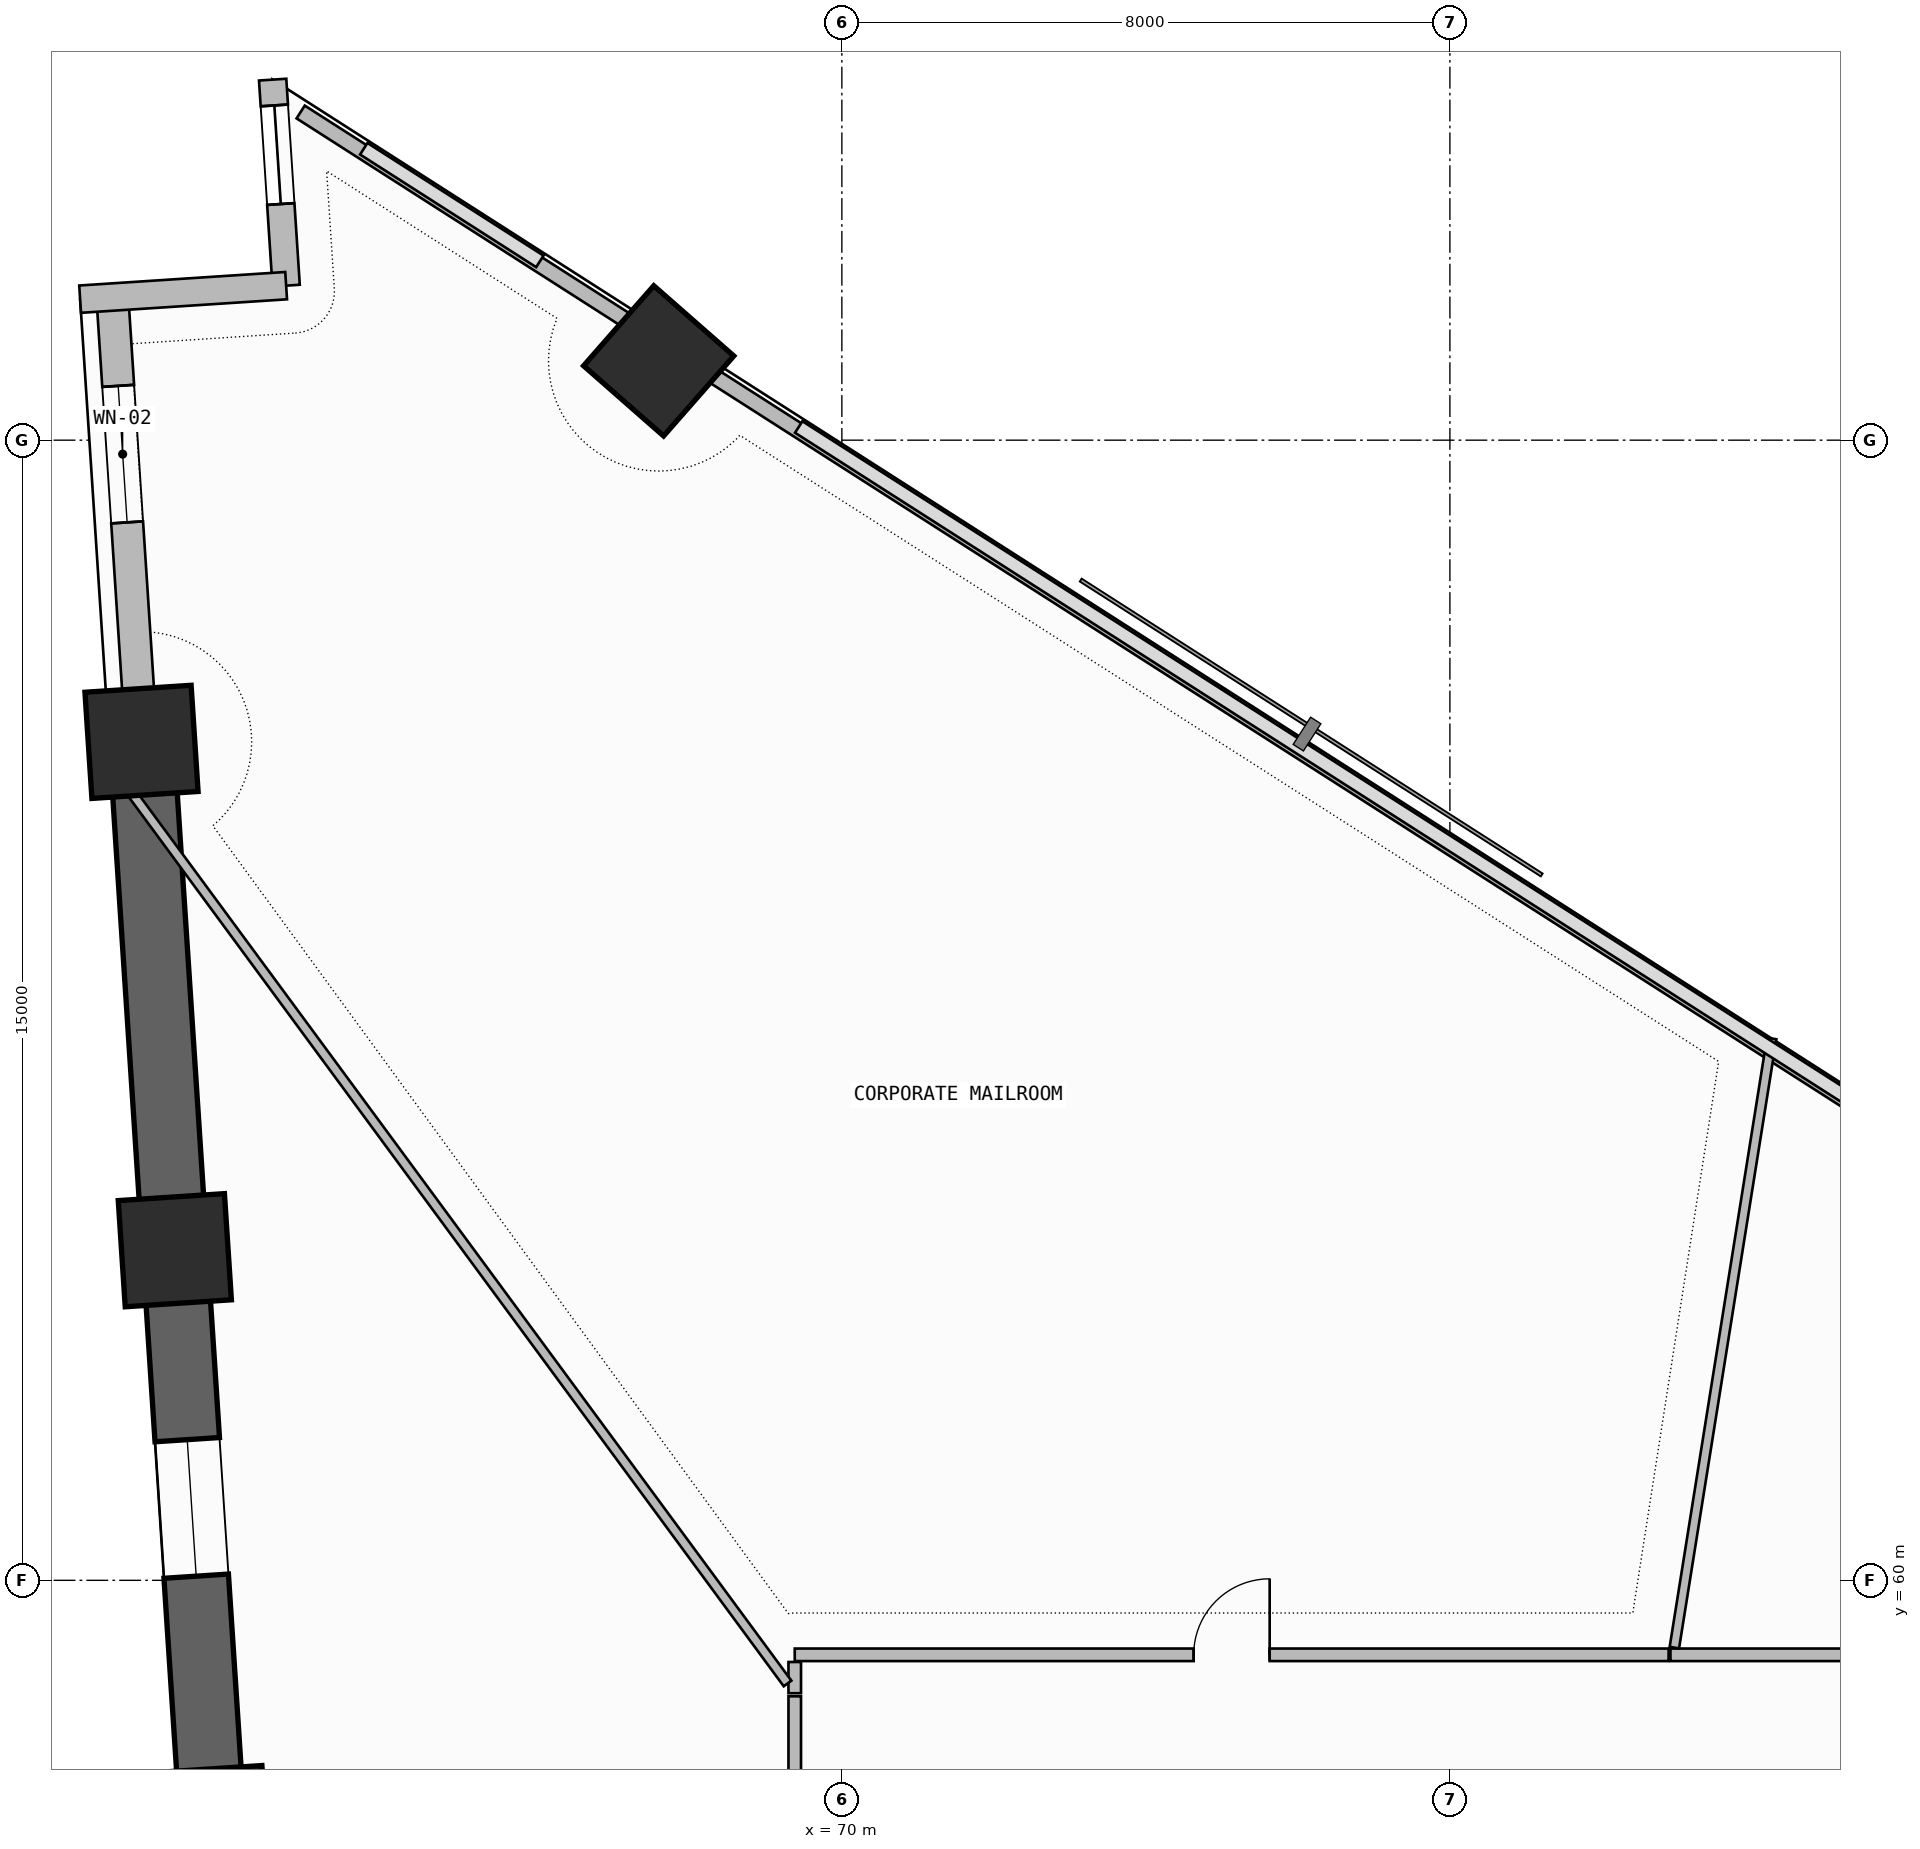
"""IFC4 building model, lengths in metres.
Left out: names, types, materials, properties, quantities, classifications, styles, units other than length and angle.
Written with IfcOpenShell. Run it as: python <this file> out.ifc"""

import sys

from ifc_helpers import new_model, si_unit, direction, frame, frame_2d, origin, origin_2d, place, context, subcontext, project, spatial, rectangle, extrude, element, fill, save


model = new_model("IFC4")
c1 = context("Model", 3, precision=1e-05, world=origin(), true_north=direction((0.0, 1.0)))
c2 = subcontext(c1, "Body", "Model", "MODEL_VIEW")
j1 = project(units=[si_unit("LENGTHUNIT", "METRE"), si_unit("PLANEANGLEUNIT", "RADIAN")], contexts=[c1])
p1 = place(None, origin())
s1 = spatial("IfcSite", under=j1, at=p1, CompositionType="ELEMENT")
p2 = place(p1, origin())
s2 = spatial("IfcBuilding", under=s1, at=p2, CompositionType="ELEMENT")
p3 = place(p2, frame((0.0, 0.0, 88.5)))
s3 = spatial("IfcBuildingStorey", under=s2, at=p3, CompositionType="ELEMENT", Elevation=88.5)
for number, where, z_axis, x_axis in (
    (1, (67.59, 76.043, 0.0), (0.0, 0.0, 1.0), (0.659, 0.752, 0.0)),
    (2, (60.785, 71.031, 0.0), (0.0, 0.0, 1.0), (-0.065, 0.998, 0.0)),
    (3, (61.224, 64.343, 0.0), (0.0, 0.0, 1.0), (-0.065, 0.998, 0.0)),
    (4, (61.717, 56.819, 0.0), (0.0, 0.0, 1.0), (-0.065, 0.998, 0.0)),
):
    element("IfcColumn", number, at=place(p3, frame(where, z_axis=z_axis, x_axis=x_axis)), inside=s3, PredefinedType="COLUMN", context=c2, shape_type="SweptSolid", body=[
        extrude(rectangle(XDim=1.4, YDim=1.4, at=origin_2d()), origin(), (0.0, 0.0, 1.0), 3.6),
    ])
p4 = place(p3, frame((60.402, 76.883, 0.0), z_axis=(0.0, 0.0, 1.0), x_axis=(0.065402662459, -0.997858953832, 0.0)))
e5 = element("IfcWall", 5, at=p4, inside=s3, PredefinedType="SOLIDWALL", context=c2, shape_type="SweptSolid", body=[
    extrude(rectangle(XDim=5.864, YDim=0.42, at=frame_2d((2.932, 0.0))), origin(), (0.0, 0.0, 1.0), 2.725),
])
p5 = place(p4, frame((1.171, 0.0, 1.2)))
e6 = element("IfcOpeningElement", 6, at=p5, cuts=e5, PredefinedType="OPENING", context=c2, shape_type="SweptSolid", body=[
    extrude(rectangle(XDim=1.8, YDim=0.9, at=frame_2d((0.9, 0.45))), frame((0.0, 0.22, 0.0), z_axis=(0.0, -1.0, 0.0), x_axis=(1.0, 0.0, 0.0)), (0.0, 0.0, 1.0), 0.44),
])
p6 = place(p3, frame((60.785, 71.031, -0.26), z_axis=(0.0, 0.0, 1.0), x_axis=(0.065409824833, -0.997858484363, 0.0)))
e7 = element("IfcWall", 7, at=p6, inside=s3, PredefinedType="SHEAR", context=c2, shape_type="SweptSolid", body=[
    extrude(rectangle(XDim=21.783, YDim=0.85, at=frame_2d((10.891, 0.0))), origin(), (0.0, 0.0, 1.0), 3.6),
])
p7 = place(p6, frame((9.2, 0.0, 1.2)))
e8 = element("IfcOpeningElement", 8, at=p7, cuts=e7, PredefinedType="OPENING", context=c2, shape_type="SweptSolid", body=[
    extrude(rectangle(XDim=1.8, YDim=0.9, at=frame_2d((0.9, 0.45))), frame((0.0, 0.435, 0.0), z_axis=(0.0, -1.0, 0.0), x_axis=(1.0, 0.0, 0.0)), (0.0, 0.0, 1.0), 0.87),
])
p8 = place(p3, frame((62.511, 79.743, 0.0), z_axis=(0.0, 0.0, 1.0), x_axis=(0.065337885661, -0.997863197386, 0.0)))
e9 = element("IfcWall", 9, at=p8, inside=s3, PredefinedType="SOLIDWALL", context=c2, shape_type="SweptSolid", body=[
    extrude(rectangle(XDim=2.717, YDim=0.36, at=frame_2d((1.358, 0.0))), origin(), (0.0, 0.0, 1.0), 3.34),
])
p9 = place(p8, frame((0.34, 0.0, 0.45)))
e10 = element("IfcOpeningElement", 10, at=p9, cuts=e9, PredefinedType="OPENING", context=c2, shape_type="SweptSolid", body=[
    extrude(rectangle(XDim=1.3, YDim=2.4, at=frame_2d((0.65, 1.2))), frame((0.0, 0.19, 0.0), z_axis=(0.0, -1.0, 0.0), x_axis=(1.0, 0.0, 0.0)), (0.0, 0.0, 1.0), 0.38),
])
p10 = place(p3, frame((62.688, 77.033, 0.0), z_axis=(0.0, 0.0, 1.0), x_axis=(-0.99785694905, -0.065433242561, 0.0)))
e11 = element("IfcWall", 11, at=p10, inside=s3, PredefinedType="SOLIDWALL", context=c2, shape_type="SweptSolid", body=[
    extrude(rectangle(XDim=2.716, YDim=0.36, at=frame_2d((1.358, 0.0))), origin(), (0.0, 0.0, 1.0), 3.34),
])
p11 = place(p3, frame((84.682, 65.372, 0.0), z_axis=(0.0, 0.0, 1.0), x_axis=(-0.842418773655, 0.538823356763, 0.0)))
e12 = element("IfcWall", 12, at=p11, inside=s3, PredefinedType="PARAPET", context=c2, shape_type="SweptSolid", body=[
    extrude(rectangle(XDim=19.612, YDim=0.2, at=frame_2d((9.806, 0.0))), origin(), (0.0, 0.0, 1.0), 1.15),
])
p12 = place(p3, frame((67.257, 76.518, 0.0), z_axis=(0.0, 0.0, 1.0), x_axis=(-0.842403631411, 0.538847030042, 0.0)))
e13 = element("IfcWall", 13, at=p12, inside=s3, PredefinedType="PARAPET", context=c2, shape_type="SweptSolid", body=[
    extrude(rectangle(XDim=5.196, YDim=0.2, at=frame_2d((2.598, 0.0))), origin(), (0.0, 0.0, 1.0), 1.15),
])
p13 = place(p3, frame((88.238, 59.02, 0.0), z_axis=(0.0, 0.0, 1.0), x_axis=(-1.0, 0.0, 0.0)))
e14 = element("IfcWall", 14, at=p13, inside=s3, PredefinedType="PARTITIONING", context=c2, shape_type="SweptSolid", body=[
    extrude(rectangle(XDim=7.336, YDim=0.165, at=frame_2d((3.668, 0.0))), origin(), (0.0, 0.0, 1.0), 2.725),
])
p14 = place(p13, frame((4.058, 0.0, 0.0)))
e15 = element("IfcOpeningElement", 15, at=p14, cuts=e14, PredefinedType="OPENING", context=c2, shape_type="SweptSolid", body=[
    extrude(rectangle(XDim=1.0, YDim=2.2, at=frame_2d((0.5, 1.1))), frame((0.0, 0.093, 0.0), z_axis=(0.0, -1.0, 0.0), x_axis=(1.0, 0.0, 0.0)), (0.0, 0.0, 1.0), 0.185),
])
p15 = place(p3, frame((80.953, 59.115, 0.0), z_axis=(0.0, 0.0, 1.0), x_axis=(0.157731190012, 0.987482086773, 0.0)))
e16 = element("IfcWall", 16, at=p15, inside=s3, PredefinedType="PARTITIONING", context=c2, shape_type="SweptSolid", body=[
    extrude(rectangle(XDim=8.115, YDim=0.125, at=frame_2d((4.058, 0.0))), origin(), (0.0, 0.0, 1.0), 2.875),
])
p16 = place(p3, frame((80.877, 59.02, 0.0), z_axis=(0.0, 0.0, 1.0), x_axis=(-1.0, 0.0, 0.0)))
e17 = element("IfcWall", 17, at=p16, inside=s3, PredefinedType="PARTITIONING", context=c2, shape_type="SweptSolid", body=[
    extrude(rectangle(XDim=11.498, YDim=0.165, at=frame_2d((5.749, 0.0))), origin(), (0.0, 0.0, 1.0), 2.725),
])
p17 = place(p16, frame((5.249, 0.0, 0.0)))
e18 = element("IfcOpeningElement", 18, at=p17, cuts=e17, PredefinedType="OPENING", context=c2, shape_type="SweptSolid", body=[
    extrude(rectangle(XDim=1.0, YDim=2.2, at=frame_2d((0.5, 1.1))), frame((0.0, 0.093, 0.0), z_axis=(0.0, -1.0, 0.0), x_axis=(1.0, 0.0, 0.0)), (0.0, 0.0, 1.0), 0.185),
])
p18 = place(p3, frame((69.38, 58.926, 0.0), z_axis=(0.0, 0.0, 1.0), x_axis=(0.0, -1.0, 0.0)))
e19 = element("IfcWall", 19, at=p18, inside=s3, PredefinedType="PARTITIONING", context=c2, shape_type="SweptSolid", body=[
    extrude(rectangle(XDim=0.411, YDim=0.165, at=frame_2d((0.206, 0.0))), origin(), (0.0, 0.0, 1.0), 2.725),
])
p19 = place(p3, frame((69.285, 58.643, 0.0), z_axis=(0.0, 0.0, 1.0), x_axis=(-0.59305096897, 0.805164919879, 0.0)))
e20 = element("IfcWall", 20, at=p19, inside=s3, PredefinedType="PARTITIONING", context=c2, shape_type="SweptSolid", body=[
    extrude(rectangle(XDim=15.018, YDim=0.125, at=frame_2d((7.509, 0.0))), origin(), (0.0, 0.0, 1.0), 2.725),
])
p20 = place(p3, frame((69.38, 58.474, 0.0), z_axis=(0.0, 0.0, 1.0), x_axis=(0.0, -1.0, 0.0)))
e21 = element("IfcWall", 21, at=p20, inside=s3, PredefinedType="PARTITIONING", context=c2, shape_type="SweptSolid", body=[
    extrude(rectangle(XDim=11.344, YDim=0.165, at=frame_2d((5.672, 0.0))), origin(), (0.0, 0.0, 1.0), 2.725),
])
p21 = place(p20, frame((7.957, 0.0, 0.0)))
e22 = element("IfcOpeningElement", 22, at=p21, cuts=e21, PredefinedType="OPENING", context=c2, shape_type="SweptSolid", body=[
    extrude(rectangle(XDim=1.0, YDim=2.2, at=frame_2d((0.5, 1.1))), frame((0.0, 0.093, 0.0), z_axis=(0.0, -1.0, 0.0), x_axis=(1.0, 0.0, 0.0)), (0.0, 0.0, 1.0), 0.185),
])
p22 = place(p5, origin())
e23 = element("IfcWindow", 23, at=p22, inside=s3, PartitioningType="SINGLE_PANEL", PredefinedType="WINDOW", context=c2, shape_type="SweptSolid", body=[
    extrude(rectangle(XDim=1.8, YDim=0.9, at=frame_2d((0.9, 0.45))), frame((0.0, 0.03, 0.0), z_axis=(0.0, -1.0, 0.0), x_axis=(1.0, 0.0, 0.0)), (0.0, 0.0, 1.0), 0.06),
])
fill(e6, e23)
p23 = place(p7, origin())
e24 = element("IfcWindow", 24, at=p23, inside=s3, PartitioningType="SINGLE_PANEL", PredefinedType="WINDOW", context=c2, shape_type="SweptSolid", body=[
    extrude(rectangle(XDim=1.8, YDim=0.9, at=frame_2d((0.9, 0.45))), frame((0.0, 0.03, 0.0), z_axis=(0.0, -1.0, 0.0), x_axis=(1.0, 0.0, 0.0)), (0.0, 0.0, 1.0), 0.06),
])
fill(e8, e24)
p24 = place(p9, origin())
e25 = element("IfcWindow", 25, at=p24, inside=s3, PartitioningType="SINGLE_PANEL", PredefinedType="WINDOW", context=c2, shape_type="SweptSolid", body=[
    extrude(rectangle(XDim=1.3, YDim=2.4, at=frame_2d((0.65, 1.2))), frame((0.0, 0.03, 0.0), z_axis=(0.0, -1.0, 0.0), x_axis=(1.0, 0.0, 0.0)), (0.0, 0.0, 1.0), 0.06),
])
fill(e10, e25)
p25 = place(p17, frame((1.0, 0.0, 0.0), z_axis=(0.0, 0.0, 1.0), x_axis=(-1.0, 0.0, 0.0)))
e26 = element("IfcDoor", 26, at=p25, inside=s3, OperationType="SINGLE_SWING_RIGHT", PredefinedType="DOOR", context=c2, shape_type="SweptSolid", body=[
    extrude(rectangle(XDim=1.0, YDim=2.2, at=frame_2d((0.5, 1.1))), frame((0.0, 0.025, 0.0), z_axis=(0.0, -1.0, 0.0), x_axis=(1.0, 0.0, 0.0)), (0.0, 0.0, 1.0), 0.05),
])
fill(e18, e26)
save(model, sys.argv[1])
